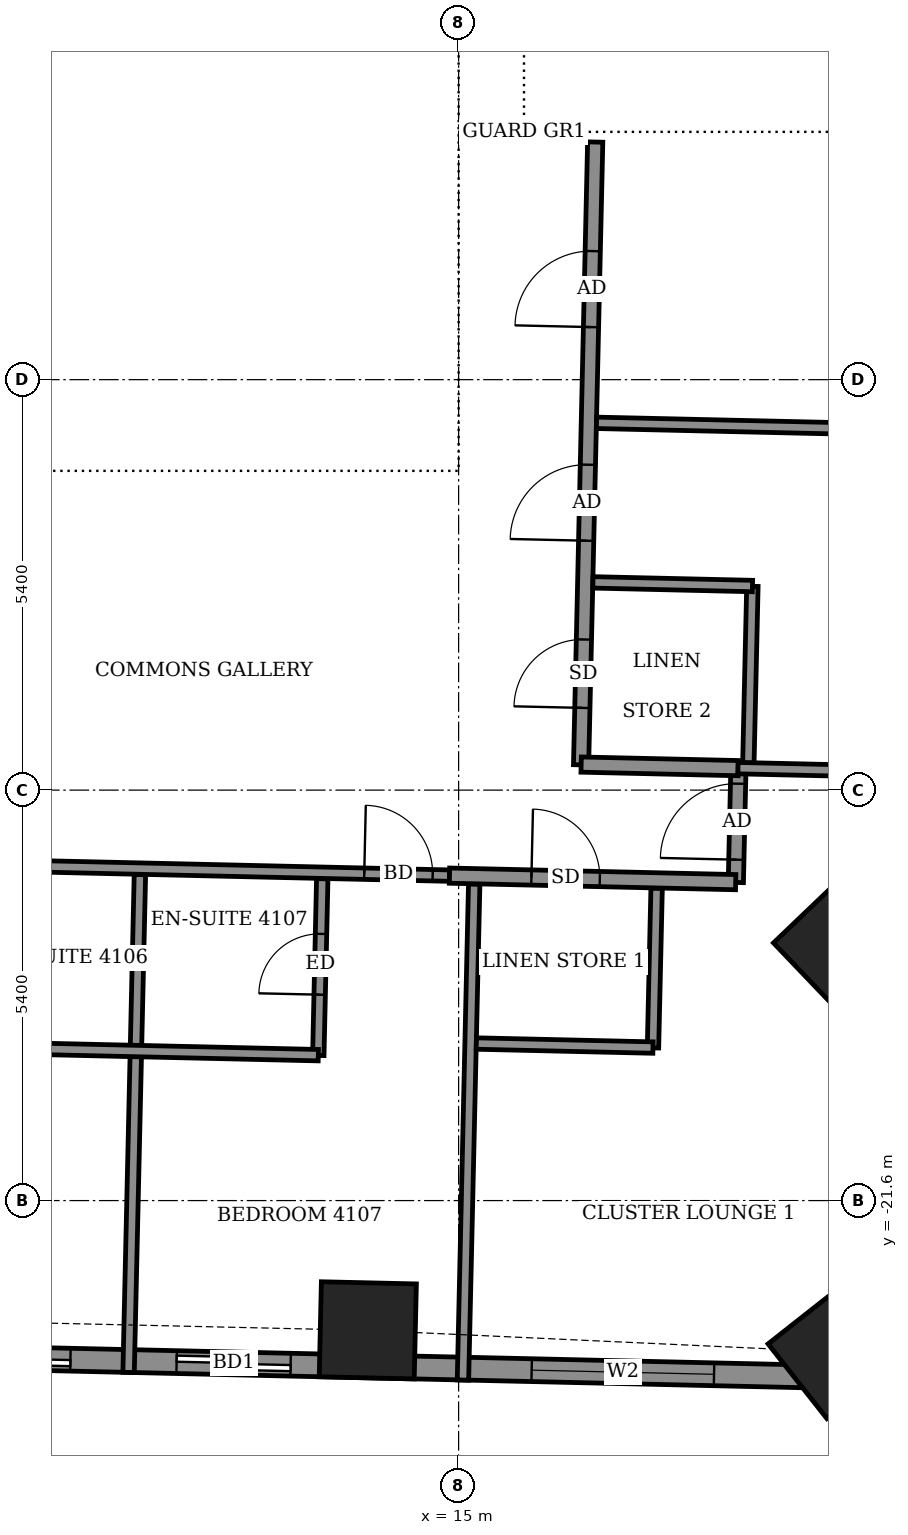
"""IFC4 building model, lengths in metres.
Left out: names, types, materials, properties, quantities, classifications, styles, units other than length and angle.
Written with IfcOpenShell. Run it as: python <this file> out.ifc"""

import sys

from ifc_helpers import new_model, si_unit, direction, frame, frame_2d, origin, origin_2d, place, context, subcontext, project, spatial, rectangle, extrude, element, fill, save


model = new_model("IFC4")
c1 = context("Model", 3, precision=1e-05, world=origin(), true_north=direction((0.0, 1.0)))
c2 = subcontext(c1, "Body", "Model", "MODEL_VIEW")
j1 = project(units=[si_unit("LENGTHUNIT", "METRE"), si_unit("PLANEANGLEUNIT", "RADIAN")], contexts=[c1])
p1 = place(None, origin())
s1 = spatial("IfcSite", under=j1, at=p1, CompositionType="ELEMENT")
p2 = place(p1, origin())
s2 = spatial("IfcBuilding", under=s1, at=p2, CompositionType="ELEMENT")
p3 = place(p2, frame((0.0, 0.0, 163.5)))
s3 = spatial("IfcBuildingStorey", under=s2, at=p3, CompositionType="ELEMENT", Elevation=163.5)
for number, where, z_axis, x_axis in (
    (1, (13.805, -23.307, -0.55), (0.0, 0.0, 1.0), (1.0, -0.023, 0.0)),
    (2, (19.949, -23.59, -0.55), (0.0, 0.0, 1.0), (0.786, 0.619, 0.0)),
    (3, (20.026, -18.23, -0.55), (0.0, 0.0, 1.0), (0.723, 0.691, 0.0)),
):
    element("IfcColumn", number, at=place(p3, frame(where, z_axis=z_axis, x_axis=x_axis)), inside=s3, PredefinedType="COLUMN", context=c2, shape_type="SweptSolid", body=[
        extrude(rectangle(XDim=1.25, YDim=1.25, at=origin_2d()), origin(), (0.0, 0.0, 1.0), 3.6),
    ])
p4 = place(p3, frame((-18.781, -23.043, 0.0), z_axis=(0.0, 0.0, 1.0), x_axis=(0.999742794992, -0.022679150367, 0.0)))
e4 = element("IfcWall", 4, at=p4, inside=s3, PredefinedType="SOLIDWALL", context=c2, shape_type="SweptSolid", body=[
    extrude(rectangle(XDim=38.98, YDim=0.3, at=frame_2d((19.49, 0.0))), origin(), (0.0, 0.0, 1.0), 3.05),
])
p5 = place(p4, frame((1.215, 0.0, 0.0)))
e5 = element("IfcOpeningElement", 5, at=p5, cuts=e4, PredefinedType="OPENING", context=c2, shape_type="SweptSolid", body=[
    extrude(rectangle(XDim=1.5, YDim=2.4, at=frame_2d((0.75, 1.2))), frame((0.0, 0.16, 0.0), z_axis=(0.0, -1.0, 0.0), x_axis=(1.0, 0.0, 0.0)), (0.0, 0.0, 1.0), 0.32),
])
p6 = place(p4, frame((3.811, 0.0, 0.0)))
e6 = element("IfcOpeningElement", 6, at=p6, cuts=e4, PredefinedType="OPENING", context=c2, shape_type="SweptSolid", body=[
    extrude(rectangle(XDim=1.5, YDim=2.4, at=frame_2d((0.75, 1.2))), frame((0.0, 0.16, 0.0), z_axis=(0.0, -1.0, 0.0), x_axis=(1.0, 0.0, 0.0)), (0.0, 0.0, 1.0), 0.32),
])
p7 = place(p4, frame((9.0, 0.0, 0.0)))
e7 = element("IfcOpeningElement", 7, at=p7, cuts=e4, PredefinedType="OPENING", context=c2, shape_type="SweptSolid", body=[
    extrude(rectangle(XDim=1.5, YDim=2.4, at=frame_2d((0.75, 1.2))), frame((0.0, 0.16, 0.0), z_axis=(0.0, -1.0, 0.0), x_axis=(1.0, 0.0, 0.0)), (0.0, 0.0, 1.0), 0.32),
])
p8 = place(p4, frame((14.109, 0.0, 0.0)))
e8 = element("IfcOpeningElement", 8, at=p8, cuts=e4, PredefinedType="OPENING", context=c2, shape_type="SweptSolid", body=[
    extrude(rectangle(XDim=1.5, YDim=2.4, at=frame_2d((0.75, 1.2))), frame((0.0, 0.16, 0.0), z_axis=(0.0, -1.0, 0.0), x_axis=(1.0, 0.0, 0.0)), (0.0, 0.0, 1.0), 0.32),
])
p9 = place(p4, frame((17.008, 0.0, 0.0)))
e9 = element("IfcOpeningElement", 9, at=p9, cuts=e4, PredefinedType="OPENING", context=c2, shape_type="SweptSolid", body=[
    extrude(rectangle(XDim=1.5, YDim=2.4, at=frame_2d((0.75, 1.2))), frame((0.0, 0.16, 0.0), z_axis=(0.0, -1.0, 0.0), x_axis=(1.0, 0.0, 0.0)), (0.0, 0.0, 1.0), 0.32),
])
p10 = place(p4, frame((22.225, 0.0, 0.0)))
e10 = element("IfcOpeningElement", 10, at=p10, cuts=e4, PredefinedType="OPENING", context=c2, shape_type="SweptSolid", body=[
    extrude(rectangle(XDim=1.5, YDim=2.4, at=frame_2d((0.75, 1.2))), frame((0.0, 0.16, 0.0), z_axis=(0.0, -1.0, 0.0), x_axis=(1.0, 0.0, 0.0)), (0.0, 0.0, 1.0), 0.32),
])
p11 = place(p4, frame((27.181, 0.0, 0.0)))
e11 = element("IfcOpeningElement", 11, at=p11, cuts=e4, PredefinedType="OPENING", context=c2, shape_type="SweptSolid", body=[
    extrude(rectangle(XDim=1.5, YDim=2.4, at=frame_2d((0.75, 1.2))), frame((0.0, 0.16, 0.0), z_axis=(0.0, -1.0, 0.0), x_axis=(1.0, 0.0, 0.0)), (0.0, 0.0, 1.0), 0.32),
])
p12 = place(p4, frame((30.079, 0.0, 0.0)))
e12 = element("IfcOpeningElement", 12, at=p12, cuts=e4, PredefinedType="OPENING", context=c2, shape_type="SweptSolid", body=[
    extrude(rectangle(XDim=1.5, YDim=2.4, at=frame_2d((0.75, 1.2))), frame((0.0, 0.16, 0.0), z_axis=(0.0, -1.0, 0.0), x_axis=(1.0, 0.0, 0.0)), (0.0, 0.0, 1.0), 0.32),
])
p13 = place(p4, frame((34.751, 0.0, 0.9)))
e13 = element("IfcOpeningElement", 13, at=p13, cuts=e4, PredefinedType="OPENING", context=c2, shape_type="SweptSolid", body=[
    extrude(rectangle(XDim=2.4, YDim=1.5, at=frame_2d((1.2, 0.75))), frame((0.0, 0.16, 0.0), z_axis=(0.0, -1.0, 0.0), x_axis=(1.0, 0.0, 0.0)), (0.0, 0.0, 1.0), 0.32),
])
p14 = place(p3, frame((10.658, -23.861, 0.0), z_axis=(0.0, 0.0, 1.0), x_axis=(0.022734104141, 0.999741546855, 0.0)))
e14 = element("IfcWall", 14, at=p14, inside=s3, PredefinedType="PARTITIONING", context=c2, shape_type="SweptSolid", body=[
    extrude(rectangle(XDim=6.551, YDim=0.15, at=frame_2d((3.275, 0.0))), origin(), (0.0, 0.0, 1.0), 2.55),
])
p15 = place(p3, frame((15.057, -23.961, 0.0), z_axis=(0.0, 0.0, 1.0), x_axis=(0.022709507457, 0.999742105881, 0.0)))
e15 = element("IfcWall", 15, at=p15, inside=s3, PredefinedType="PARTITIONING", context=c2, shape_type="SweptSolid", body=[
    extrude(rectangle(XDim=6.526, YDim=0.15, at=frame_2d((3.263, 0.0))), origin(), (0.0, 0.0, 1.0), 2.55),
])
p16 = place(p3, frame((13.154, -19.691, 0.0), z_axis=(0.0, 0.0, 1.0), x_axis=(0.022361308448, 0.999749954681, 0.0)))
e16 = element("IfcWall", 16, at=p16, inside=s3, PredefinedType="PARTITIONING", context=c2, shape_type="SweptSolid", body=[
    extrude(rectangle(XDim=2.325, YDim=0.15, at=frame_2d((1.163, 0.0))), origin(), (0.0, 0.0, 1.0), 3.05),
])
p17 = place(p16, frame((0.8, 0.0, 0.0)))
e17 = element("IfcOpeningElement", 17, at=p17, cuts=e16, PredefinedType="OPENING", context=c2, shape_type="SweptSolid", body=[
    extrude(rectangle(XDim=0.8, YDim=2.1, at=frame_2d((0.4, 1.05))), frame((0.0, 0.085, 0.0), z_axis=(0.0, -1.0, 0.0), x_axis=(1.0, 0.0, 0.0)), (0.0, 0.0, 1.0), 0.17),
])
p18 = place(p3, frame((8.355, -19.578, 0.0), z_axis=(0.0, 0.0, 1.0), x_axis=(0.99974154664, -0.022734113616, 0.0)))
e18 = element("IfcWall", 18, at=p18, inside=s3, PredefinedType="PARTITIONING", context=c2, shape_type="SweptSolid", body=[
    extrude(rectangle(XDim=4.8, YDim=0.15, at=frame_2d((2.4, 0.0))), origin(), (0.0, 0.0, 1.0), 3.05),
])
p19 = place(p3, frame((17.557, -19.591, 0.0), z_axis=(0.0, 0.0, 1.0), x_axis=(0.022895647347, 0.999737860308, 0.0)))
e19 = element("IfcWall", 19, at=p19, inside=s3, PredefinedType="PARTITIONING", context=c2, shape_type="SweptSolid", body=[
    extrude(rectangle(XDim=2.101, YDim=0.15, at=frame_2d((1.05, 0.0))), origin(), (0.0, 0.0, 1.0), 3.05),
])
p20 = place(p3, frame((15.233, -19.534, 0.0), z_axis=(0.0, 0.0, 1.0), x_axis=(0.999740260747, -0.02279059109, 0.0)))
e20 = element("IfcWall", 20, at=p20, inside=s3, PredefinedType="PARTITIONING", context=c2, shape_type="SweptSolid", body=[
    extrude(rectangle(XDim=2.324, YDim=0.15, at=frame_2d((1.162, 0.0))), origin(), (0.0, 0.0, 1.0), 3.05),
])
p21 = place(p3, frame((18.647, -17.415, 0.0), z_axis=(0.0, 0.0, 1.0), x_axis=(0.022617910375, 0.999744182344, 0.0)))
e21 = element("IfcWall", 21, at=p21, inside=s3, PredefinedType="PARTITIONING", context=c2, shape_type="SweptSolid", body=[
    extrude(rectangle(XDim=1.5, YDim=0.2, at=frame_2d((0.75, 0.0))), origin(), (0.0, 0.0, 1.0), 3.05),
])
p22 = place(p21, frame((0.3, 0.0, 0.0)))
e22 = element("IfcOpeningElement", 22, at=p22, cuts=e21, PredefinedType="OPENING", context=c2, shape_type="SweptSolid", body=[
    extrude(rectangle(XDim=1.0, YDim=2.1, at=frame_2d((0.5, 1.05))), frame((0.0, 0.11, 0.0), z_axis=(0.0, -1.0, 0.0), x_axis=(1.0, 0.0, 0.0)), (0.0, 0.0, 1.0), 0.22),
])
p23 = place(p3, frame((-15.649, -16.633, 0.0), z_axis=(0.0, 0.0, 1.0), x_axis=(0.999743261737, -0.022658565952, 0.0)))
e23 = element("IfcWall", 23, at=p23, inside=s3, PredefinedType="PARTITIONING", context=c2, shape_type="SweptSolid", body=[
    extrude(rectangle(XDim=30.536, YDim=0.15, at=frame_2d((15.268, 0.0))), origin(), (0.0, 0.0, 1.0), 3.05),
])
p24 = place(p23, frame((3.09, 0.0, 0.0)))
e24 = element("IfcOpeningElement", 24, at=p24, cuts=e23, PredefinedType="OPENING", context=c2, shape_type="SweptSolid", body=[
    extrude(rectangle(XDim=0.9, YDim=2.1, at=frame_2d((0.45, 1.05))), frame((0.0, 0.085, 0.0), z_axis=(0.0, -1.0, 0.0), x_axis=(1.0, 0.0, 0.0)), (0.0, 0.0, 1.0), 0.17),
])
p25 = place(p23, frame((5.115, 0.0, 0.0)))
e25 = element("IfcOpeningElement", 25, at=p25, cuts=e23, PredefinedType="OPENING", context=c2, shape_type="SweptSolid", body=[
    extrude(rectangle(XDim=0.9, YDim=2.1, at=frame_2d((0.45, 1.05))), frame((0.0, 0.085, 0.0), z_axis=(0.0, -1.0, 0.0), x_axis=(1.0, 0.0, 0.0)), (0.0, 0.0, 1.0), 0.17),
])
p26 = place(p23, frame((11.94, 0.0, 0.0)))
e26 = element("IfcOpeningElement", 26, at=p26, cuts=e23, PredefinedType="OPENING", context=c2, shape_type="SweptSolid", body=[
    extrude(rectangle(XDim=0.9, YDim=2.1, at=frame_2d((0.45, 1.05))), frame((0.0, 0.085, 0.0), z_axis=(0.0, -1.0, 0.0), x_axis=(1.0, 0.0, 0.0)), (0.0, 0.0, 1.0), 0.17),
])
p27 = place(p23, frame((13.965, 0.0, 0.0)))
e27 = element("IfcOpeningElement", 27, at=p27, cuts=e23, PredefinedType="OPENING", context=c2, shape_type="SweptSolid", body=[
    extrude(rectangle(XDim=0.9, YDim=2.1, at=frame_2d((0.45, 1.05))), frame((0.0, 0.085, 0.0), z_axis=(0.0, -1.0, 0.0), x_axis=(1.0, 0.0, 0.0)), (0.0, 0.0, 1.0), 0.17),
])
p28 = place(p23, frame((20.74, 0.0, 0.0)))
e28 = element("IfcOpeningElement", 28, at=p28, cuts=e23, PredefinedType="OPENING", context=c2, shape_type="SweptSolid", body=[
    extrude(rectangle(XDim=0.9, YDim=2.1, at=frame_2d((0.45, 1.05))), frame((0.0, 0.085, 0.0), z_axis=(0.0, -1.0, 0.0), x_axis=(1.0, 0.0, 0.0)), (0.0, 0.0, 1.0), 0.17),
])
p29 = place(p23, frame((22.665, 0.0, 0.0)))
e29 = element("IfcOpeningElement", 29, at=p29, cuts=e23, PredefinedType="OPENING", context=c2, shape_type="SweptSolid", body=[
    extrude(rectangle(XDim=0.9, YDim=2.1, at=frame_2d((0.45, 1.05))), frame((0.0, 0.085, 0.0), z_axis=(0.0, -1.0, 0.0), x_axis=(1.0, 0.0, 0.0)), (0.0, 0.0, 1.0), 0.17),
])
p30 = place(p23, frame((29.415, 0.0, 0.0)))
e30 = element("IfcOpeningElement", 30, at=p30, cuts=e23, PredefinedType="OPENING", context=c2, shape_type="SweptSolid", body=[
    extrude(rectangle(XDim=0.9, YDim=2.1, at=frame_2d((0.45, 1.05))), frame((0.0, 0.085, 0.0), z_axis=(0.0, -1.0, 0.0), x_axis=(1.0, 0.0, 0.0)), (0.0, 0.0, 1.0), 0.17),
])
p31 = place(p3, frame((14.88, -17.325, 0.0), z_axis=(0.0, 0.0, 1.0), x_axis=(0.999739622, -0.022818593369, 0.0)))
e31 = element("IfcWall", 31, at=p31, inside=s3, PredefinedType="PARTITIONING", context=c2, shape_type="SweptSolid", body=[
    extrude(rectangle(XDim=3.766, YDim=0.2, at=frame_2d((1.883, 0.0))), origin(), (0.0, 0.0, 1.0), 3.05),
])
p32 = place(p31, frame((1.078, 0.0, 0.0)))
e32 = element("IfcOpeningElement", 32, at=p32, cuts=e31, PredefinedType="OPENING", context=c2, shape_type="SweptSolid", body=[
    extrude(rectangle(XDim=0.9, YDim=2.1, at=frame_2d((0.45, 1.05))), frame((0.0, 0.11, 0.0), z_axis=(0.0, -1.0, 0.0), x_axis=(1.0, 0.0, 0.0)), (0.0, 0.0, 1.0), 0.22),
])
p33 = place(p3, frame((16.611, -15.868, 0.0), z_axis=(0.0, 0.0, 1.0), x_axis=(0.022698399288, 0.999742358145, 0.0)))
e33 = element("IfcWall", 33, at=p33, inside=s3, PredefinedType="PARTITIONING", context=c2, shape_type="SweptSolid", body=[
    extrude(rectangle(XDim=8.196, YDim=0.2, at=frame_2d((4.098, 0.0))), origin(), (0.0, 0.0, 1.0), 3.05),
])
p34 = place(p33, frame((2.95, 0.0, 0.0)))
e34 = element("IfcOpeningElement", 34, at=p34, cuts=e33, PredefinedType="OPENING", context=c2, shape_type="SweptSolid", body=[
    extrude(rectangle(XDim=1.0, YDim=2.1, at=frame_2d((0.5, 1.05))), frame((0.0, 0.11, 0.0), z_axis=(0.0, -1.0, 0.0), x_axis=(1.0, 0.0, 0.0)), (0.0, 0.0, 1.0), 0.22),
])
p35 = place(p33, frame((0.75, 0.0, 0.0)))
e35 = element("IfcOpeningElement", 35, at=p35, cuts=e33, PredefinedType="OPENING", context=c2, shape_type="SweptSolid", body=[
    extrude(rectangle(XDim=0.9, YDim=2.1, at=frame_2d((0.45, 1.05))), frame((0.0, 0.11, 0.0), z_axis=(0.0, -1.0, 0.0), x_axis=(1.0, 0.0, 0.0)), (0.0, 0.0, 1.0), 0.22),
])
p36 = place(p33, frame((5.761, 0.0, 0.0)))
e36 = element("IfcOpeningElement", 36, at=p36, cuts=e33, PredefinedType="OPENING", context=c2, shape_type="SweptSolid", body=[
    extrude(rectangle(XDim=1.0, YDim=2.1, at=frame_2d((0.5, 1.05))), frame((0.0, 0.11, 0.0), z_axis=(0.0, -1.0, 0.0), x_axis=(1.0, 0.0, 0.0)), (0.0, 0.0, 1.0), 0.22),
])
p37 = place(p3, frame((18.812, -15.843, 0.0), z_axis=(0.0, 0.0, 1.0), x_axis=(0.02279059109, 0.999740260747, 0.0)))
e37 = element("IfcWall", 37, at=p37, inside=s3, PredefinedType="PARTITIONING", context=c2, shape_type="SweptSolid", body=[
    extrude(rectangle(XDim=2.324, YDim=0.15, at=frame_2d((1.162, 0.0))), origin(), (0.0, 0.0, 1.0), 3.05),
])
p38 = place(p3, frame((16.612, -15.864, 0.0), z_axis=(0.0, 0.0, 1.0), x_axis=(0.999742931749, -0.02267312106, 0.0)))
e38 = element("IfcWall", 38, at=p38, inside=s3, PredefinedType="PARTITIONING", context=c2, shape_type="SweptSolid", body=[
    extrude(rectangle(XDim=2.067, YDim=0.2, at=frame_2d((1.034, 0.0))), origin(), (0.0, 0.0, 1.0), 3.05),
])
p39 = place(p3, frame((18.675, -15.911, 0.0), z_axis=(0.0, 0.0, 1.0), x_axis=(0.999743624132, -0.022642570706, 0.0)))
e39 = element("IfcWall", 39, at=p39, inside=s3, PredefinedType="PARTITIONING", context=c2, shape_type="SweptSolid", body=[
    extrude(rectangle(XDim=7.246, YDim=0.15, at=frame_2d((3.623, 0.0))), origin(), (0.0, 0.0, 1.0), 2.55),
])
p40 = place(p3, frame((16.767, -13.467, 0.0), z_axis=(0.0, 0.0, 1.0), x_axis=(0.999740212033, -0.022792727877, 0.0)))
e40 = element("IfcWall", 40, at=p40, inside=s3, PredefinedType="PARTITIONING", context=c2, shape_type="SweptSolid", body=[
    extrude(rectangle(XDim=2.099, YDim=0.15, at=frame_2d((1.05, 0.0))), origin(), (0.0, 0.0, 1.0), 3.05),
])
p41 = place(p3, frame((16.814, -11.368, 0.0), z_axis=(0.0, 0.0, 1.0), x_axis=(0.999742492059, -0.02269250035, 0.0)))
e41 = element("IfcWall", 41, at=p41, inside=s3, PredefinedType="PARTITIONING", context=c2, shape_type="SweptSolid", body=[
    extrude(rectangle(XDim=9.209, YDim=0.15, at=frame_2d((4.605, 0.0))), origin(), (0.0, 0.0, 1.0), 2.55),
])
p42 = place(p3, frame((-14.7, -11.25, 0.0), z_axis=(0.0, 0.0, 1.0), x_axis=(1.0, 0.0, 0.0)))
e42 = element("IfcWall", 42, at=p42, inside=s3, PredefinedType="SHEAR", context=c2, shape_type="SweptSolid", body=[
    extrude(rectangle(XDim=29.4, YDim=0.9, at=frame_2d((14.7, 0.0))), origin(), (0.0, 0.0, 1.0), 3.6),
])
p43 = place(p3, frame((14.25, -10.8, 0.0), z_axis=(0.0, 0.0, 1.0), x_axis=(0.0, 1.0, 0.0)))
e43 = element("IfcWall", 43, at=p43, inside=s3, PredefinedType="SHEAR", context=c2, shape_type="SweptSolid", body=[
    extrude(rectangle(XDim=21.6, YDim=0.9, at=frame_2d((10.8, 0.0))), origin(), (0.0, 0.0, 1.0), 3.6),
])
p44 = place(p43, frame((1.2, 0.0, 0.0)))
e44 = element("IfcOpeningElement", 44, at=p44, cuts=e43, PredefinedType="OPENING", context=c2, shape_type="SweptSolid", body=[
    extrude(rectangle(XDim=1.2, YDim=2.1, at=frame_2d((0.6, 1.05))), frame((0.0, 0.46, 0.0), z_axis=(0.0, -1.0, 0.0), x_axis=(1.0, 0.0, 0.0)), (0.0, 0.0, 1.0), 0.92),
])
p45 = place(p3, frame((10.8, -10.8, 0.0), z_axis=(0.0, 0.0, 1.0), x_axis=(0.0, 1.0, 0.0)))
e45 = element("IfcWall", 45, at=p45, inside=s3, PredefinedType="SHEAR", context=c2, shape_type="SweptSolid", body=[
    extrude(rectangle(XDim=7.5, YDim=0.2, at=frame_2d((3.75, 0.0))), origin(), (0.0, 0.0, 1.0), 3.05),
])
p46 = place(p11, origin())
e46 = element("IfcDoor", 46, at=p46, inside=s3, OperationType="SLIDING_TO_LEFT", PredefinedType="DOOR", context=c2, shape_type="SweptSolid", body=[
    extrude(rectangle(XDim=1.5, YDim=2.4, at=frame_2d((0.75, 1.2))), frame((0.0, 0.025, 0.0), z_axis=(0.0, -1.0, 0.0), x_axis=(1.0, 0.0, 0.0)), (0.0, 0.0, 1.0), 0.05),
])
fill(e11, e46)
p47 = place(p12, origin())
e47 = element("IfcDoor", 47, at=p47, inside=s3, OperationType="SLIDING_TO_LEFT", PredefinedType="DOOR", context=c2, shape_type="SweptSolid", body=[
    extrude(rectangle(XDim=1.5, YDim=2.4, at=frame_2d((0.75, 1.2))), frame((0.0, 0.025, 0.0), z_axis=(0.0, -1.0, 0.0), x_axis=(1.0, 0.0, 0.0)), (0.0, 0.0, 1.0), 0.05),
])
fill(e12, e47)
p48 = place(p13, origin())
e48 = element("IfcWindow", 48, at=p48, inside=s3, PartitioningType="DOUBLE_PANEL_VERTICAL", PredefinedType="WINDOW", context=c2, shape_type="SweptSolid", body=[
    extrude(rectangle(XDim=2.4, YDim=1.5, at=frame_2d((1.2, 0.75))), frame((0.0, 0.03, 0.0), z_axis=(0.0, -1.0, 0.0), x_axis=(1.0, 0.0, 0.0)), (0.0, 0.0, 1.0), 0.06),
])
fill(e13, e48)
p49 = place(p30, origin())
e49 = element("IfcDoor", 49, at=p49, inside=s3, OperationType="SINGLE_SWING_LEFT", PredefinedType="DOOR", context=c2, shape_type="SweptSolid", body=[
    extrude(rectangle(XDim=0.9, YDim=2.1, at=frame_2d((0.45, 1.05))), frame((0.0, 0.025, 0.0), z_axis=(0.0, -1.0, 0.0), x_axis=(1.0, 0.0, 0.0)), (0.0, 0.0, 1.0), 0.05),
])
fill(e30, e49)
p50 = place(p17, origin())
e50 = element("IfcDoor", 50, at=p50, inside=s3, OperationType="SINGLE_SWING_LEFT", PredefinedType="DOOR", context=c2, shape_type="SweptSolid", body=[
    extrude(rectangle(XDim=0.8, YDim=2.1, at=frame_2d((0.4, 1.05))), frame((0.0, 0.025, 0.0), z_axis=(0.0, -1.0, 0.0), x_axis=(1.0, 0.0, 0.0)), (0.0, 0.0, 1.0), 0.05),
])
fill(e17, e50)
p51 = place(p22, origin())
e51 = element("IfcDoor", 51, at=p51, inside=s3, OperationType="SINGLE_SWING_RIGHT", PredefinedType="DOOR", context=c2, shape_type="SweptSolid", body=[
    extrude(rectangle(XDim=1.0, YDim=2.1, at=frame_2d((0.5, 1.05))), frame((0.0, 0.025, 0.0), z_axis=(0.0, -1.0, 0.0), x_axis=(1.0, 0.0, 0.0)), (0.0, 0.0, 1.0), 0.05),
])
fill(e22, e51)
p52 = place(p32, origin())
e52 = element("IfcDoor", 52, at=p52, inside=s3, OperationType="SINGLE_SWING_LEFT", PredefinedType="DOOR", context=c2, shape_type="SweptSolid", body=[
    extrude(rectangle(XDim=0.9, YDim=2.1, at=frame_2d((0.45, 1.05))), frame((0.0, 0.025, 0.0), z_axis=(0.0, -1.0, 0.0), x_axis=(1.0, 0.0, 0.0)), (0.0, 0.0, 1.0), 0.05),
])
fill(e32, e52)
p53 = place(p34, origin())
e53 = element("IfcDoor", 53, at=p53, inside=s3, OperationType="SINGLE_SWING_LEFT", PredefinedType="DOOR", context=c2, shape_type="SweptSolid", body=[
    extrude(rectangle(XDim=1.0, YDim=2.1, at=frame_2d((0.5, 1.05))), frame((0.0, 0.025, 0.0), z_axis=(0.0, -1.0, 0.0), x_axis=(1.0, 0.0, 0.0)), (0.0, 0.0, 1.0), 0.05),
])
fill(e34, e53)
p54 = place(p35, origin())
e54 = element("IfcDoor", 54, at=p54, inside=s3, OperationType="SINGLE_SWING_RIGHT", PredefinedType="DOOR", context=c2, shape_type="SweptSolid", body=[
    extrude(rectangle(XDim=0.9, YDim=2.1, at=frame_2d((0.45, 1.05))), frame((0.0, 0.025, 0.0), z_axis=(0.0, -1.0, 0.0), x_axis=(1.0, 0.0, 0.0)), (0.0, 0.0, 1.0), 0.05),
])
fill(e35, e54)
p55 = place(p36, origin())
e55 = element("IfcDoor", 55, at=p55, inside=s3, OperationType="SINGLE_SWING_RIGHT", PredefinedType="DOOR", context=c2, shape_type="SweptSolid", body=[
    extrude(rectangle(XDim=1.0, YDim=2.1, at=frame_2d((0.5, 1.05))), frame((0.0, 0.025, 0.0), z_axis=(0.0, -1.0, 0.0), x_axis=(1.0, 0.0, 0.0)), (0.0, 0.0, 1.0), 0.05),
])
fill(e36, e55)
p56 = place(p44, origin())
e56 = element("IfcDoor", 56, at=p56, inside=s3, OperationType="DOUBLE_DOOR_SINGLE_SWING", PredefinedType="DOOR", context=c2, shape_type="SweptSolid", body=[
    extrude(rectangle(XDim=1.2, YDim=2.1, at=frame_2d((0.6, 1.05))), frame((0.0, 0.025, 0.0), z_axis=(0.0, -1.0, 0.0), x_axis=(1.0, 0.0, 0.0)), (0.0, 0.0, 1.0), 0.05),
])
fill(e44, e56)
save(model, sys.argv[1])
